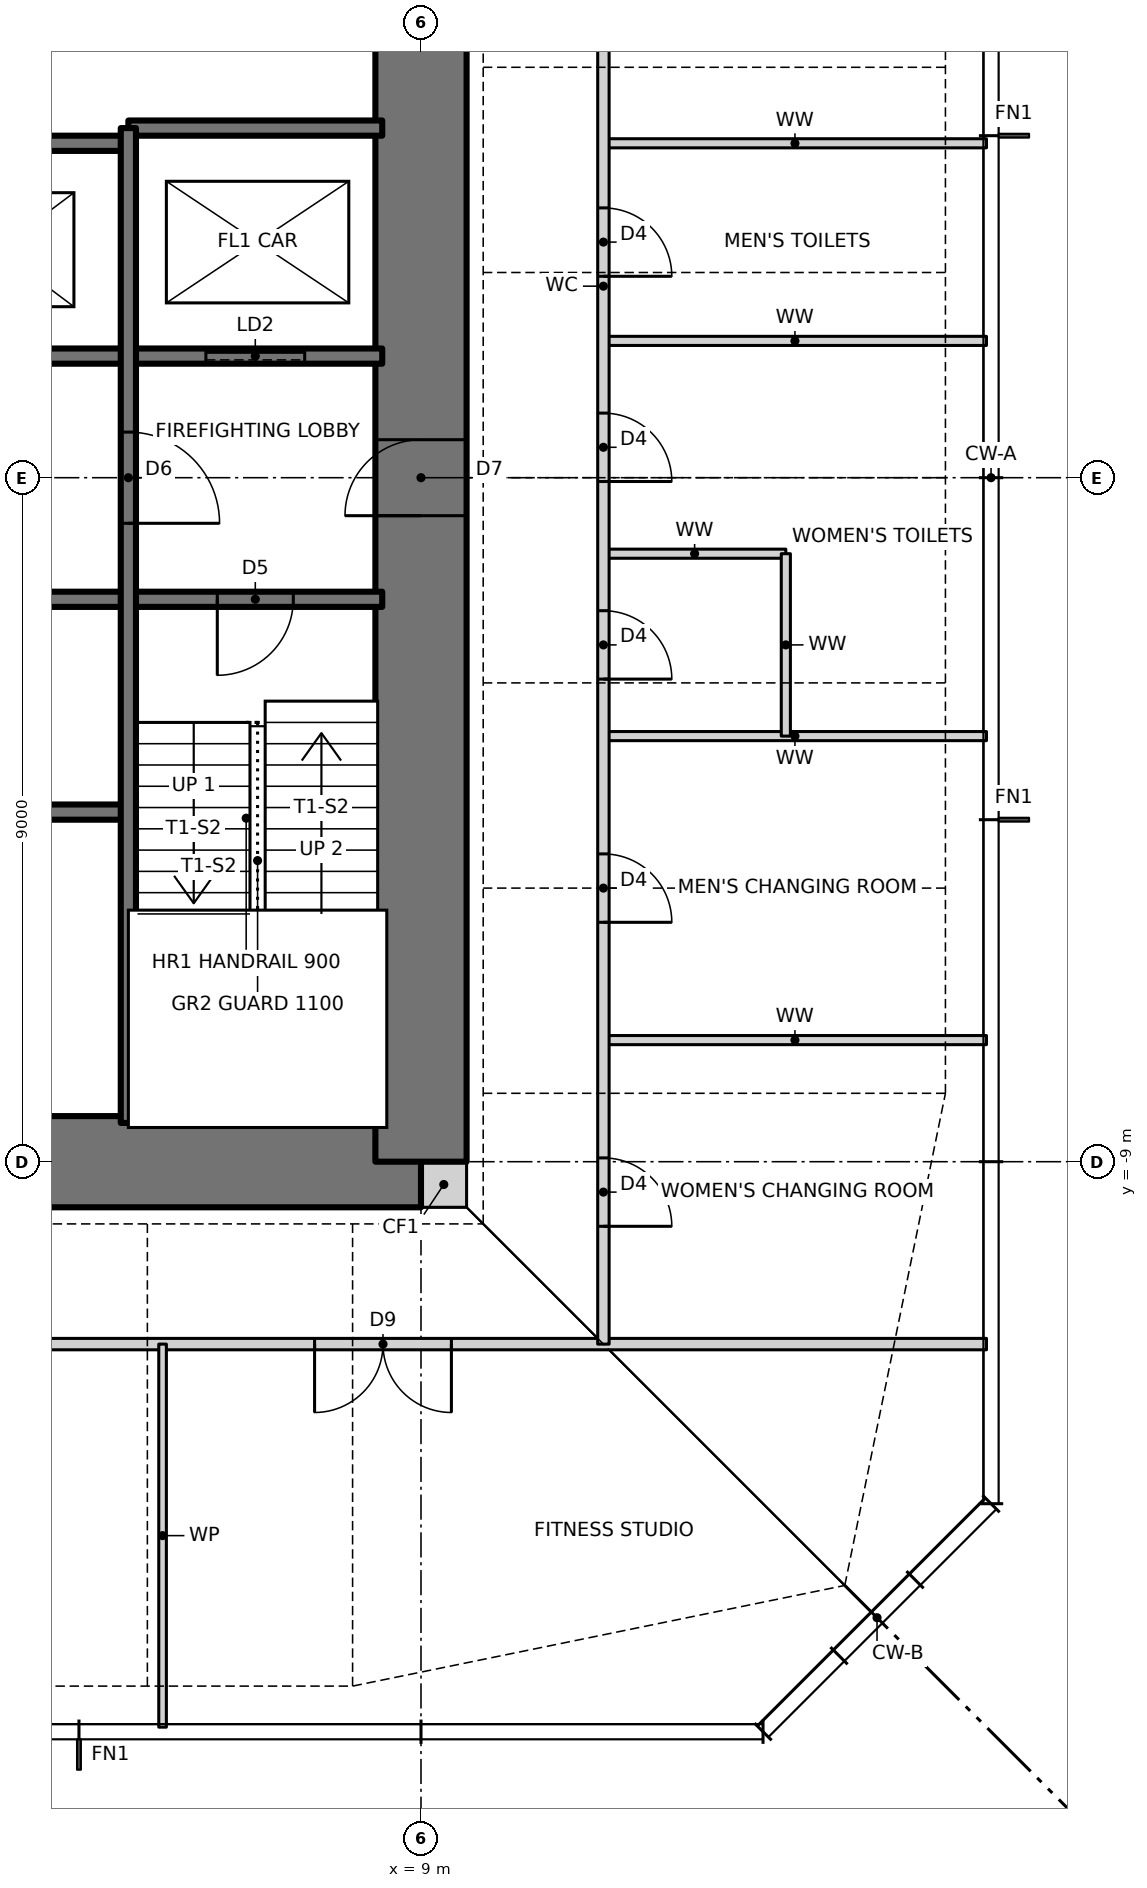
"""IFC4 building model, lengths in metres.
Left out: names, types, materials, properties, quantities, classifications, styles, units other than length and angle.
Written with IfcOpenShell. Run it as: python <this file> out.ifc"""

import sys

from ifc_helpers import new_model, si_unit, direction, frame, frame_2d, origin, place, context, subcontext, project, spatial, rectangle, extrude, element, fill, save


model = new_model("IFC4")
c1 = context("Model", 3, precision=1e-05, world=origin(), true_north=direction((0.0, 1.0)))
c2 = subcontext(c1, "Body", "Model", "MODEL_VIEW")
j1 = project(units=[si_unit("LENGTHUNIT", "METRE"), si_unit("PLANEANGLEUNIT", "RADIAN")], contexts=[c1])
p1 = place(None, origin())
s1 = spatial("IfcSite", under=j1, at=p1, CompositionType="ELEMENT")
p2 = place(p1, origin())
s2 = spatial("IfcBuilding", under=s1, at=p2, CompositionType="ELEMENT")
p3 = place(p2, frame((0.0, 0.0, 215.0)))
s3 = spatial("IfcBuildingStorey", under=s2, at=p3, CompositionType="ELEMENT", Elevation=215.0)
p4 = place(p3, frame((9.0, -9.3, 0.0), z_axis=(0.0, 0.0, 1.0), x_axis=(1.0, 0.0, 0.0)))
e1 = element("IfcWall", 1, at=p4, inside=s3, PredefinedType="SOLIDWALL", context=c2, shape_type="SweptSolid", body=[
    extrude(rectangle(XDim=0.6, YDim=0.6, at=frame_2d((0.3, 0.0))), origin(), (0.0, 0.0, 1.0), 3.5),
])
p5 = place(p3, frame((-9.0, -9.0, 0.0), z_axis=(0.0, 0.0, 1.0), x_axis=(1.0, 0.0, 0.0)))
e2 = element("IfcWall", 2, at=p5, inside=s3, PredefinedType="SHEAR", context=c2, shape_type="SweptSolid", body=[
    extrude(rectangle(XDim=18.0, YDim=1.2, at=frame_2d((9.0, 0.0))), origin(), (0.0, 0.0, 1.0), 3.5),
])
p6 = place(p5, frame((3.775, 0.0, 0.0)))
e3 = element("IfcOpeningElement", 3, at=p6, cuts=e2, PredefinedType="OPENING", context=c2, shape_type="SweptSolid", body=[
    extrude(rectangle(XDim=0.9, YDim=2.1, at=frame_2d((0.45, 1.05))), frame((0.0, 0.61, 0.0), z_axis=(0.0, -1.0, 0.0), x_axis=(1.0, 0.0, 0.0)), (0.0, 0.0, 1.0), 1.22),
])
p7 = place(p5, frame((10.625, 0.0, 0.0)))
e4 = element("IfcOpeningElement", 4, at=p7, cuts=e2, PredefinedType="OPENING", context=c2, shape_type="SweptSolid", body=[
    extrude(rectangle(XDim=0.9, YDim=2.1, at=frame_2d((0.45, 1.05))), frame((0.0, 0.61, 0.0), z_axis=(0.0, -1.0, 0.0), x_axis=(1.0, 0.0, 0.0)), (0.0, 0.0, 1.0), 1.22),
])
p8 = place(p3, frame((9.0, -9.0, 0.0), z_axis=(0.0, 0.0, 1.0), x_axis=(0.0, 1.0, 0.0)))
e5 = element("IfcWall", 5, at=p8, inside=s3, PredefinedType="SHEAR", context=c2, shape_type="SweptSolid", body=[
    extrude(rectangle(XDim=18.0, YDim=1.2, at=frame_2d((9.0, 0.0))), origin(), (0.0, 0.0, 1.0), 3.5),
])
p9 = place(p8, frame((8.5, 0.0, 0.0)))
e6 = element("IfcOpeningElement", 6, at=p9, cuts=e5, PredefinedType="OPENING", context=c2, shape_type="SweptSolid", body=[
    extrude(rectangle(XDim=1.0, YDim=2.1, at=frame_2d((0.5, 1.05))), frame((0.0, 0.61, 0.0), z_axis=(0.0, -1.0, 0.0), x_axis=(1.0, 0.0, 0.0)), (0.0, 0.0, 1.0), 1.22),
])
p10 = place(p3, frame((-11.4, -11.4, 0.0), z_axis=(0.0, 0.0, 1.0), x_axis=(1.0, 0.0, 0.0)))
e7 = element("IfcWall", 7, at=p10, inside=s3, PredefinedType="PARTITIONING", context=c2, shape_type="SweptSolid", body=[
    extrude(rectangle(XDim=27.84, YDim=0.15, at=frame_2d((13.92, 0.0))), origin(), (0.0, 0.0, 1.0), 3.27),
])
p11 = place(p10, frame((7.6, 0.0, 0.0)))
e8 = element("IfcOpeningElement", 8, at=p11, cuts=e7, PredefinedType="OPENING", context=c2, shape_type="SweptSolid", body=[
    extrude(rectangle(XDim=1.8, YDim=2.1, at=frame_2d((0.9, 1.05))), frame((0.0, 0.085, 0.0), z_axis=(0.0, -1.0, 0.0), x_axis=(1.0, 0.0, 0.0)), (0.0, 0.0, 1.0), 0.17),
])
p12 = place(p10, frame((19.0, 0.0, 0.0)))
e9 = element("IfcOpeningElement", 9, at=p12, cuts=e7, PredefinedType="OPENING", context=c2, shape_type="SweptSolid", body=[
    extrude(rectangle(XDim=1.8, YDim=2.1, at=frame_2d((0.9, 1.05))), frame((0.0, 0.085, 0.0), z_axis=(0.0, -1.0, 0.0), x_axis=(1.0, 0.0, 0.0)), (0.0, 0.0, 1.0), 0.17),
])
p13 = place(p3, frame((11.4, -7.4, 0.0), z_axis=(0.0, 0.0, 1.0), x_axis=(1.0, 0.0, 0.0)))
e10 = element("IfcWall", 10, at=p13, inside=s3, PredefinedType="PARTITIONING", context=c2, shape_type="SweptSolid", body=[
    extrude(rectangle(XDim=5.04, YDim=0.12, at=frame_2d((2.52, 0.0))), origin(), (0.0, 0.0, 1.0), 3.27),
])
p14 = place(p3, frame((-8.49, -4.4, 0.0), z_axis=(0.0, 0.0, 1.0), x_axis=(1.0, 0.0, 0.0)))
e11 = element("IfcWall", 11, at=p14, inside=s3, PredefinedType="SOLIDWALL", context=c2, shape_type="SweptSolid", body=[
    extrude(rectangle(XDim=13.64, YDim=0.2, at=frame_2d((6.82, 0.0))), origin(), (0.0, 0.0, 1.0), 3.5),
])
p15 = place(p3, frame((11.4, -3.4, 0.0), z_axis=(0.0, 0.0, 1.0), x_axis=(1.0, 0.0, 0.0)))
e12 = element("IfcWall", 12, at=p15, inside=s3, PredefinedType="PARTITIONING", context=c2, shape_type="SweptSolid", body=[
    extrude(rectangle(XDim=5.04, YDim=0.12, at=frame_2d((2.52, 0.0))), origin(), (0.0, 0.0, 1.0), 3.27),
])
p16 = place(p3, frame((-8.49, -1.6, 0.0), z_axis=(0.0, 0.0, 1.0), x_axis=(1.0, 0.0, 0.0)))
e13 = element("IfcWall", 13, at=p16, inside=s3, PredefinedType="SOLIDWALL", context=c2, shape_type="SweptSolid", body=[
    extrude(rectangle(XDim=16.98, YDim=0.2, at=frame_2d((8.49, 0.0))), origin(), (0.0, 0.0, 1.0), 3.5),
])
p17 = place(p16, frame((14.81, 0.0, 0.0)))
e14 = element("IfcOpeningElement", 14, at=p17, cuts=e13, PredefinedType="OPENING", context=c2, shape_type="SweptSolid", body=[
    extrude(rectangle(XDim=1.0, YDim=2.1, at=frame_2d((0.5, 1.05))), frame((0.0, 0.11, 0.0), z_axis=(0.0, -1.0, 0.0), x_axis=(1.0, 0.0, 0.0)), (0.0, 0.0, 1.0), 0.22),
])
p18 = place(p16, frame((1.232, 0.0, 0.0)))
e15 = element("IfcOpeningElement", 15, at=p18, cuts=e13, PredefinedType="OPENING", context=c2, shape_type="SweptSolid", body=[
    extrude(rectangle(XDim=0.9, YDim=2.1, at=frame_2d((0.45, 1.05))), frame((0.0, 0.11, 0.0), z_axis=(0.0, -1.0, 0.0), x_axis=(1.0, 0.0, 0.0)), (0.0, 0.0, 1.0), 0.22),
])
p19 = place(p16, frame((4.627, 0.0, 0.0)))
e16 = element("IfcOpeningElement", 16, at=p19, cuts=e13, PredefinedType="OPENING", context=c2, shape_type="SweptSolid", body=[
    extrude(rectangle(XDim=0.9, YDim=2.1, at=frame_2d((0.45, 1.05))), frame((0.0, 0.11, 0.0), z_axis=(0.0, -1.0, 0.0), x_axis=(1.0, 0.0, 0.0)), (0.0, 0.0, 1.0), 0.22),
])
p20 = place(p16, frame((8.052, 0.0, 0.0)))
e17 = element("IfcOpeningElement", 17, at=p20, cuts=e13, PredefinedType="OPENING", context=c2, shape_type="SweptSolid", body=[
    extrude(rectangle(XDim=0.9, YDim=2.1, at=frame_2d((0.45, 1.05))), frame((0.0, 0.11, 0.0), z_axis=(0.0, -1.0, 0.0), x_axis=(1.0, 0.0, 0.0)), (0.0, 0.0, 1.0), 0.22),
])
p21 = place(p16, frame((11.478, 0.0, 0.0)))
e18 = element("IfcOpeningElement", 18, at=p21, cuts=e13, PredefinedType="OPENING", context=c2, shape_type="SweptSolid", body=[
    extrude(rectangle(XDim=0.9, YDim=2.1, at=frame_2d((0.45, 1.05))), frame((0.0, 0.11, 0.0), z_axis=(0.0, -1.0, 0.0), x_axis=(1.0, 0.0, 0.0)), (0.0, 0.0, 1.0), 0.22),
])
p22 = place(p3, frame((11.4, -1.0, 0.0), z_axis=(0.0, 0.0, 1.0), x_axis=(1.0, 0.0, 0.0)))
e19 = element("IfcWall", 19, at=p22, inside=s3, PredefinedType="PARTITIONING", context=c2, shape_type="SweptSolid", body=[
    extrude(rectangle(XDim=2.4, YDim=0.12, at=frame_2d((1.2, 0.0))), origin(), (0.0, 0.0, 1.0), 3.27),
])
p23 = place(p3, frame((-8.49, 1.6, 0.0), z_axis=(0.0, 0.0, 1.0), x_axis=(1.0, 0.0, 0.0)))
e20 = element("IfcWall", 20, at=p23, inside=s3, PredefinedType="SOLIDWALL", context=c2, shape_type="SweptSolid", body=[
    extrude(rectangle(XDim=16.98, YDim=0.2, at=frame_2d((8.49, 0.0))), origin(), (0.0, 0.0, 1.0), 3.5),
])
p24 = place(p23, frame((1.17, 0.0, 0.0)))
e21 = element("IfcOpeningElement", 21, at=p24, cuts=e20, PredefinedType="OPENING", context=c2, shape_type="SweptSolid", body=[
    extrude(rectangle(XDim=1.0, YDim=2.1, at=frame_2d((0.5, 1.05))), frame((0.0, 0.11, 0.0), z_axis=(0.0, -1.0, 0.0), x_axis=(1.0, 0.0, 0.0)), (0.0, 0.0, 1.0), 0.22),
])
p25 = place(p23, frame((4.606, 0.0, 0.0)))
e22 = element("IfcOpeningElement", 22, at=p25, cuts=e20, PredefinedType="OPENING", context=c2, shape_type="SweptSolid", body=[
    extrude(rectangle(XDim=0.9, YDim=2.1, at=frame_2d((0.45, 1.05))), frame((0.0, 0.11, 0.0), z_axis=(0.0, -1.0, 0.0), x_axis=(1.0, 0.0, 0.0)), (0.0, 0.0, 1.0), 0.22),
])
p26 = place(p23, frame((8.04, 0.0, 0.0)))
e23 = element("IfcOpeningElement", 23, at=p26, cuts=e20, PredefinedType="OPENING", context=c2, shape_type="SweptSolid", body=[
    extrude(rectangle(XDim=0.9, YDim=2.1, at=frame_2d((0.45, 1.05))), frame((0.0, 0.11, 0.0), z_axis=(0.0, -1.0, 0.0), x_axis=(1.0, 0.0, 0.0)), (0.0, 0.0, 1.0), 0.22),
])
p27 = place(p23, frame((11.374, 0.0, 0.0)))
e24 = element("IfcOpeningElement", 24, at=p27, cuts=e20, PredefinedType="OPENING", context=c2, shape_type="SweptSolid", body=[
    extrude(rectangle(XDim=1.1, YDim=2.1, at=frame_2d((0.55, 1.05))), frame((0.0, 0.11, 0.0), z_axis=(0.0, -1.0, 0.0), x_axis=(1.0, 0.0, 0.0)), (0.0, 0.0, 1.0), 0.22),
])
p28 = place(p23, frame((14.66, 0.0, 0.0)))
e25 = element("IfcOpeningElement", 25, at=p28, cuts=e20, PredefinedType="OPENING", context=c2, shape_type="SweptSolid", body=[
    extrude(rectangle(XDim=1.3, YDim=2.1, at=frame_2d((0.65, 1.05))), frame((0.0, 0.11, 0.0), z_axis=(0.0, -1.0, 0.0), x_axis=(1.0, 0.0, 0.0)), (0.0, 0.0, 1.0), 0.22),
])
p29 = place(p3, frame((11.4, 1.8, 0.0), z_axis=(0.0, 0.0, 1.0), x_axis=(1.0, 0.0, 0.0)))
e26 = element("IfcWall", 26, at=p29, inside=s3, PredefinedType="PARTITIONING", context=c2, shape_type="SweptSolid", body=[
    extrude(rectangle(XDim=5.04, YDim=0.12, at=frame_2d((2.52, 0.0))), origin(), (0.0, 0.0, 1.0), 3.27),
])
p30 = place(p3, frame((-5.15, 4.4, 0.0), z_axis=(0.0, 0.0, 1.0), x_axis=(1.0, 0.0, 0.0)))
e27 = element("IfcWall", 27, at=p30, inside=s3, PredefinedType="SOLIDWALL", context=c2, shape_type="SweptSolid", body=[
    extrude(rectangle(XDim=10.3, YDim=0.2, at=frame_2d((5.15, 0.0))), origin(), (0.0, 0.0, 1.0), 3.5),
])
p31 = place(p3, frame((11.4, 4.4, 0.0), z_axis=(0.0, 0.0, 1.0), x_axis=(1.0, 0.0, 0.0)))
e28 = element("IfcWall", 28, at=p31, inside=s3, PredefinedType="PARTITIONING", context=c2, shape_type="SweptSolid", body=[
    extrude(rectangle(XDim=5.04, YDim=0.12, at=frame_2d((2.52, 0.0))), origin(), (0.0, 0.0, 1.0), 3.27),
])
p32 = place(p3, frame((5.15, 4.6, 0.0), z_axis=(0.0, 0.0, 1.0), x_axis=(1.0, 0.0, 0.0)))
e29 = element("IfcWall", 29, at=p32, inside=s3, PredefinedType="SOLIDWALL", context=c2, shape_type="SweptSolid", body=[
    extrude(rectangle(XDim=3.34, YDim=0.2, at=frame_2d((1.67, 0.0))), origin(), (0.0, 0.0, 1.0), 3.5),
])
p33 = place(p3, frame((13.8, -3.4, 0.0), z_axis=(0.0, 0.0, 1.0), x_axis=(0.0, 1.0, 0.0)))
e30 = element("IfcWall", 30, at=p33, inside=s3, PredefinedType="PARTITIONING", context=c2, shape_type="SweptSolid", body=[
    extrude(rectangle(XDim=2.4, YDim=0.12, at=frame_2d((1.2, 0.0))), origin(), (0.0, 0.0, 1.0), 3.27),
])
p34 = place(p3, frame((11.4, -11.4, 0.0), z_axis=(0.0, 0.0, 1.0), x_axis=(0.0, 1.0, 0.0)))
e31 = element("IfcWall", 31, at=p34, inside=s3, PredefinedType="PARTITIONING", context=c2, shape_type="SweptSolid", body=[
    extrude(rectangle(XDim=27.84, YDim=0.15, at=frame_2d((13.92, 0.0))), origin(), (0.0, 0.0, 1.0), 3.27),
])
p35 = place(p34, frame((1.55, 0.0, 0.0)))
e32 = element("IfcOpeningElement", 32, at=p35, cuts=e31, PredefinedType="OPENING", context=c2, shape_type="SweptSolid", body=[
    extrude(rectangle(XDim=0.9, YDim=2.1, at=frame_2d((0.45, 1.05))), frame((0.0, 0.085, 0.0), z_axis=(0.0, -1.0, 0.0), x_axis=(1.0, 0.0, 0.0)), (0.0, 0.0, 1.0), 0.17),
])
p36 = place(p34, frame((5.55, 0.0, 0.0)))
e33 = element("IfcOpeningElement", 33, at=p36, cuts=e31, PredefinedType="OPENING", context=c2, shape_type="SweptSolid", body=[
    extrude(rectangle(XDim=0.9, YDim=2.1, at=frame_2d((0.45, 1.05))), frame((0.0, 0.085, 0.0), z_axis=(0.0, -1.0, 0.0), x_axis=(1.0, 0.0, 0.0)), (0.0, 0.0, 1.0), 0.17),
])
p37 = place(p34, frame((8.75, 0.0, 0.0)))
e34 = element("IfcOpeningElement", 34, at=p37, cuts=e31, PredefinedType="OPENING", context=c2, shape_type="SweptSolid", body=[
    extrude(rectangle(XDim=0.9, YDim=2.1, at=frame_2d((0.45, 1.05))), frame((0.0, 0.085, 0.0), z_axis=(0.0, -1.0, 0.0), x_axis=(1.0, 0.0, 0.0)), (0.0, 0.0, 1.0), 0.17),
])
p38 = place(p34, frame((11.35, 0.0, 0.0)))
e35 = element("IfcOpeningElement", 35, at=p38, cuts=e31, PredefinedType="OPENING", context=c2, shape_type="SweptSolid", body=[
    extrude(rectangle(XDim=0.9, YDim=2.1, at=frame_2d((0.45, 1.05))), frame((0.0, 0.085, 0.0), z_axis=(0.0, -1.0, 0.0), x_axis=(1.0, 0.0, 0.0)), (0.0, 0.0, 1.0), 0.17),
])
p39 = place(p34, frame((14.05, 0.0, 0.0)))
e36 = element("IfcOpeningElement", 36, at=p39, cuts=e31, PredefinedType="OPENING", context=c2, shape_type="SweptSolid", body=[
    extrude(rectangle(XDim=0.9, YDim=2.1, at=frame_2d((0.45, 1.05))), frame((0.0, 0.085, 0.0), z_axis=(0.0, -1.0, 0.0), x_axis=(1.0, 0.0, 0.0)), (0.0, 0.0, 1.0), 0.17),
])
p40 = place(p34, frame((18.4, 0.0, 0.0)))
e37 = element("IfcOpeningElement", 37, at=p40, cuts=e31, PredefinedType="OPENING", context=c2, shape_type="SweptSolid", body=[
    extrude(rectangle(XDim=1.8, YDim=2.1, at=frame_2d((0.9, 1.05))), frame((0.0, 0.085, 0.0), z_axis=(0.0, -1.0, 0.0), x_axis=(1.0, 0.0, 0.0)), (0.0, 0.0, 1.0), 0.17),
])
p41 = place(p3, frame((5.6, -16.44, 0.0), z_axis=(0.0, 0.0, 1.0), x_axis=(0.0, 1.0, 0.0)))
e38 = element("IfcWall", 38, at=p41, inside=s3, PredefinedType="PARTITIONING", context=c2, shape_type="SweptSolid", body=[
    extrude(rectangle(XDim=5.04, YDim=0.1, at=frame_2d((2.52, 0.0))), origin(), (0.0, 0.0, 1.0), 3.27),
])
p42 = place(p3, frame((5.15, -8.49, 0.0), z_axis=(0.0, 0.0, 1.0), x_axis=(0.0, 1.0, 0.0)))
e39 = element("IfcWall", 39, at=p42, inside=s3, PredefinedType="SOLIDWALL", context=c2, shape_type="SweptSolid", body=[
    extrude(rectangle(XDim=13.09, YDim=0.2, at=frame_2d((6.545, 0.0))), origin(), (0.0, 0.0, 1.0), 3.5),
])
p43 = place(p42, frame((7.89, 0.0, 0.0)))
e40 = element("IfcOpeningElement", 40, at=p43, cuts=e39, PredefinedType="OPENING", context=c2, shape_type="SweptSolid", body=[
    extrude(rectangle(XDim=1.2, YDim=2.1, at=frame_2d((0.6, 1.05))), frame((0.0, 0.11, 0.0), z_axis=(0.0, -1.0, 0.0), x_axis=(1.0, 0.0, 0.0)), (0.0, 0.0, 1.0), 0.22),
])
p44 = place(p17, frame((1.0, 0.0, 0.0), z_axis=(0.0, 0.0, 1.0), x_axis=(-1.0, 0.0, 0.0)))
e41 = element("IfcDoor", 41, at=p44, inside=s3, OperationType="SINGLE_SWING_RIGHT", PredefinedType="DOOR", context=c2, shape_type="SweptSolid", body=[
    extrude(rectangle(XDim=1.0, YDim=2.1, at=frame_2d((0.5, 1.05))), frame((0.0, 0.025, 0.0), z_axis=(0.0, -1.0, 0.0), x_axis=(1.0, 0.0, 0.0)), (0.0, 0.0, 1.0), 0.05),
])
fill(e14, e41)
p45 = place(p43, frame((1.2, 0.0, 0.0), z_axis=(0.0, 0.0, 1.0), x_axis=(-1.0, 0.0, 0.0)))
e42 = element("IfcDoor", 42, at=p45, inside=s3, OperationType="SINGLE_SWING_RIGHT", PredefinedType="DOOR", context=c2, shape_type="SweptSolid", body=[
    extrude(rectangle(XDim=1.2, YDim=2.1, at=frame_2d((0.6, 1.05))), frame((0.0, 0.025, 0.0), z_axis=(0.0, -1.0, 0.0), x_axis=(1.0, 0.0, 0.0)), (0.0, 0.0, 1.0), 0.05),
])
fill(e40, e42)
p46 = place(p12, frame((1.8, 0.0, 0.0), z_axis=(0.0, 0.0, 1.0), x_axis=(-1.0, 0.0, 0.0)))
e43 = element("IfcDoor", 43, at=p46, inside=s3, OperationType="DOUBLE_DOOR_SINGLE_SWING", PredefinedType="DOOR", context=c2, shape_type="SweptSolid", body=[
    extrude(rectangle(XDim=1.8, YDim=2.1, at=frame_2d((0.9, 1.05))), frame((0.0, 0.025, 0.0), z_axis=(0.0, -1.0, 0.0), x_axis=(1.0, 0.0, 0.0)), (0.0, 0.0, 1.0), 0.05),
])
fill(e9, e43)
p47 = place(p35, frame((0.9, 0.0, 0.0), z_axis=(0.0, 0.0, 1.0), x_axis=(-1.0, 0.0, 0.0)))
e44 = element("IfcDoor", 44, at=p47, inside=s3, OperationType="SINGLE_SWING_RIGHT", PredefinedType="DOOR", context=c2, shape_type="SweptSolid", body=[
    extrude(rectangle(XDim=0.9, YDim=2.1, at=frame_2d((0.45, 1.05))), frame((0.0, 0.025, 0.0), z_axis=(0.0, -1.0, 0.0), x_axis=(1.0, 0.0, 0.0)), (0.0, 0.0, 1.0), 0.05),
])
fill(e32, e44)
p48 = place(p36, frame((0.9, 0.0, 0.0), z_axis=(0.0, 0.0, 1.0), x_axis=(-1.0, 0.0, 0.0)))
e45 = element("IfcDoor", 45, at=p48, inside=s3, OperationType="SINGLE_SWING_RIGHT", PredefinedType="DOOR", context=c2, shape_type="SweptSolid", body=[
    extrude(rectangle(XDim=0.9, YDim=2.1, at=frame_2d((0.45, 1.05))), frame((0.0, 0.025, 0.0), z_axis=(0.0, -1.0, 0.0), x_axis=(1.0, 0.0, 0.0)), (0.0, 0.0, 1.0), 0.05),
])
fill(e33, e45)
p49 = place(p37, frame((0.9, 0.0, 0.0), z_axis=(0.0, 0.0, 1.0), x_axis=(-1.0, 0.0, 0.0)))
e46 = element("IfcDoor", 46, at=p49, inside=s3, OperationType="SINGLE_SWING_RIGHT", PredefinedType="DOOR", context=c2, shape_type="SweptSolid", body=[
    extrude(rectangle(XDim=0.9, YDim=2.1, at=frame_2d((0.45, 1.05))), frame((0.0, 0.025, 0.0), z_axis=(0.0, -1.0, 0.0), x_axis=(1.0, 0.0, 0.0)), (0.0, 0.0, 1.0), 0.05),
])
fill(e34, e46)
p50 = place(p38, frame((0.9, 0.0, 0.0), z_axis=(0.0, 0.0, 1.0), x_axis=(-1.0, 0.0, 0.0)))
e47 = element("IfcDoor", 47, at=p50, inside=s3, OperationType="SINGLE_SWING_RIGHT", PredefinedType="DOOR", context=c2, shape_type="SweptSolid", body=[
    extrude(rectangle(XDim=0.9, YDim=2.1, at=frame_2d((0.45, 1.05))), frame((0.0, 0.025, 0.0), z_axis=(0.0, -1.0, 0.0), x_axis=(1.0, 0.0, 0.0)), (0.0, 0.0, 1.0), 0.05),
])
fill(e35, e47)
p51 = place(p39, frame((0.9, 0.0, 0.0), z_axis=(0.0, 0.0, 1.0), x_axis=(-1.0, 0.0, 0.0)))
e48 = element("IfcDoor", 48, at=p51, inside=s3, OperationType="SINGLE_SWING_RIGHT", PredefinedType="DOOR", context=c2, shape_type="SweptSolid", body=[
    extrude(rectangle(XDim=0.9, YDim=2.1, at=frame_2d((0.45, 1.05))), frame((0.0, 0.025, 0.0), z_axis=(0.0, -1.0, 0.0), x_axis=(1.0, 0.0, 0.0)), (0.0, 0.0, 1.0), 0.05),
])
fill(e36, e48)
p52 = place(p9, origin())
e49 = element("IfcDoor", 49, at=p52, inside=s3, OperationType="SINGLE_SWING_LEFT", PredefinedType="DOOR", context=c2, shape_type="SweptSolid", body=[
    extrude(rectangle(XDim=1.0, YDim=2.1, at=frame_2d((0.5, 1.05))), frame((0.0, 0.025, 0.0), z_axis=(0.0, -1.0, 0.0), x_axis=(1.0, 0.0, 0.0)), (0.0, 0.0, 1.0), 0.05),
])
fill(e6, e49)
p53 = place(p28, origin())
e50 = element("IfcDoor", 50, at=p53, inside=s3, OperationType="SLIDING_TO_LEFT", PredefinedType="DOOR", context=c2, shape_type="SweptSolid", body=[
    extrude(rectangle(XDim=1.3, YDim=2.1, at=frame_2d((0.65, 1.05))), frame((0.0, 0.025, 0.0), z_axis=(0.0, -1.0, 0.0), x_axis=(1.0, 0.0, 0.0)), (0.0, 0.0, 1.0), 0.05),
])
fill(e25, e50)
save(model, sys.argv[1])
